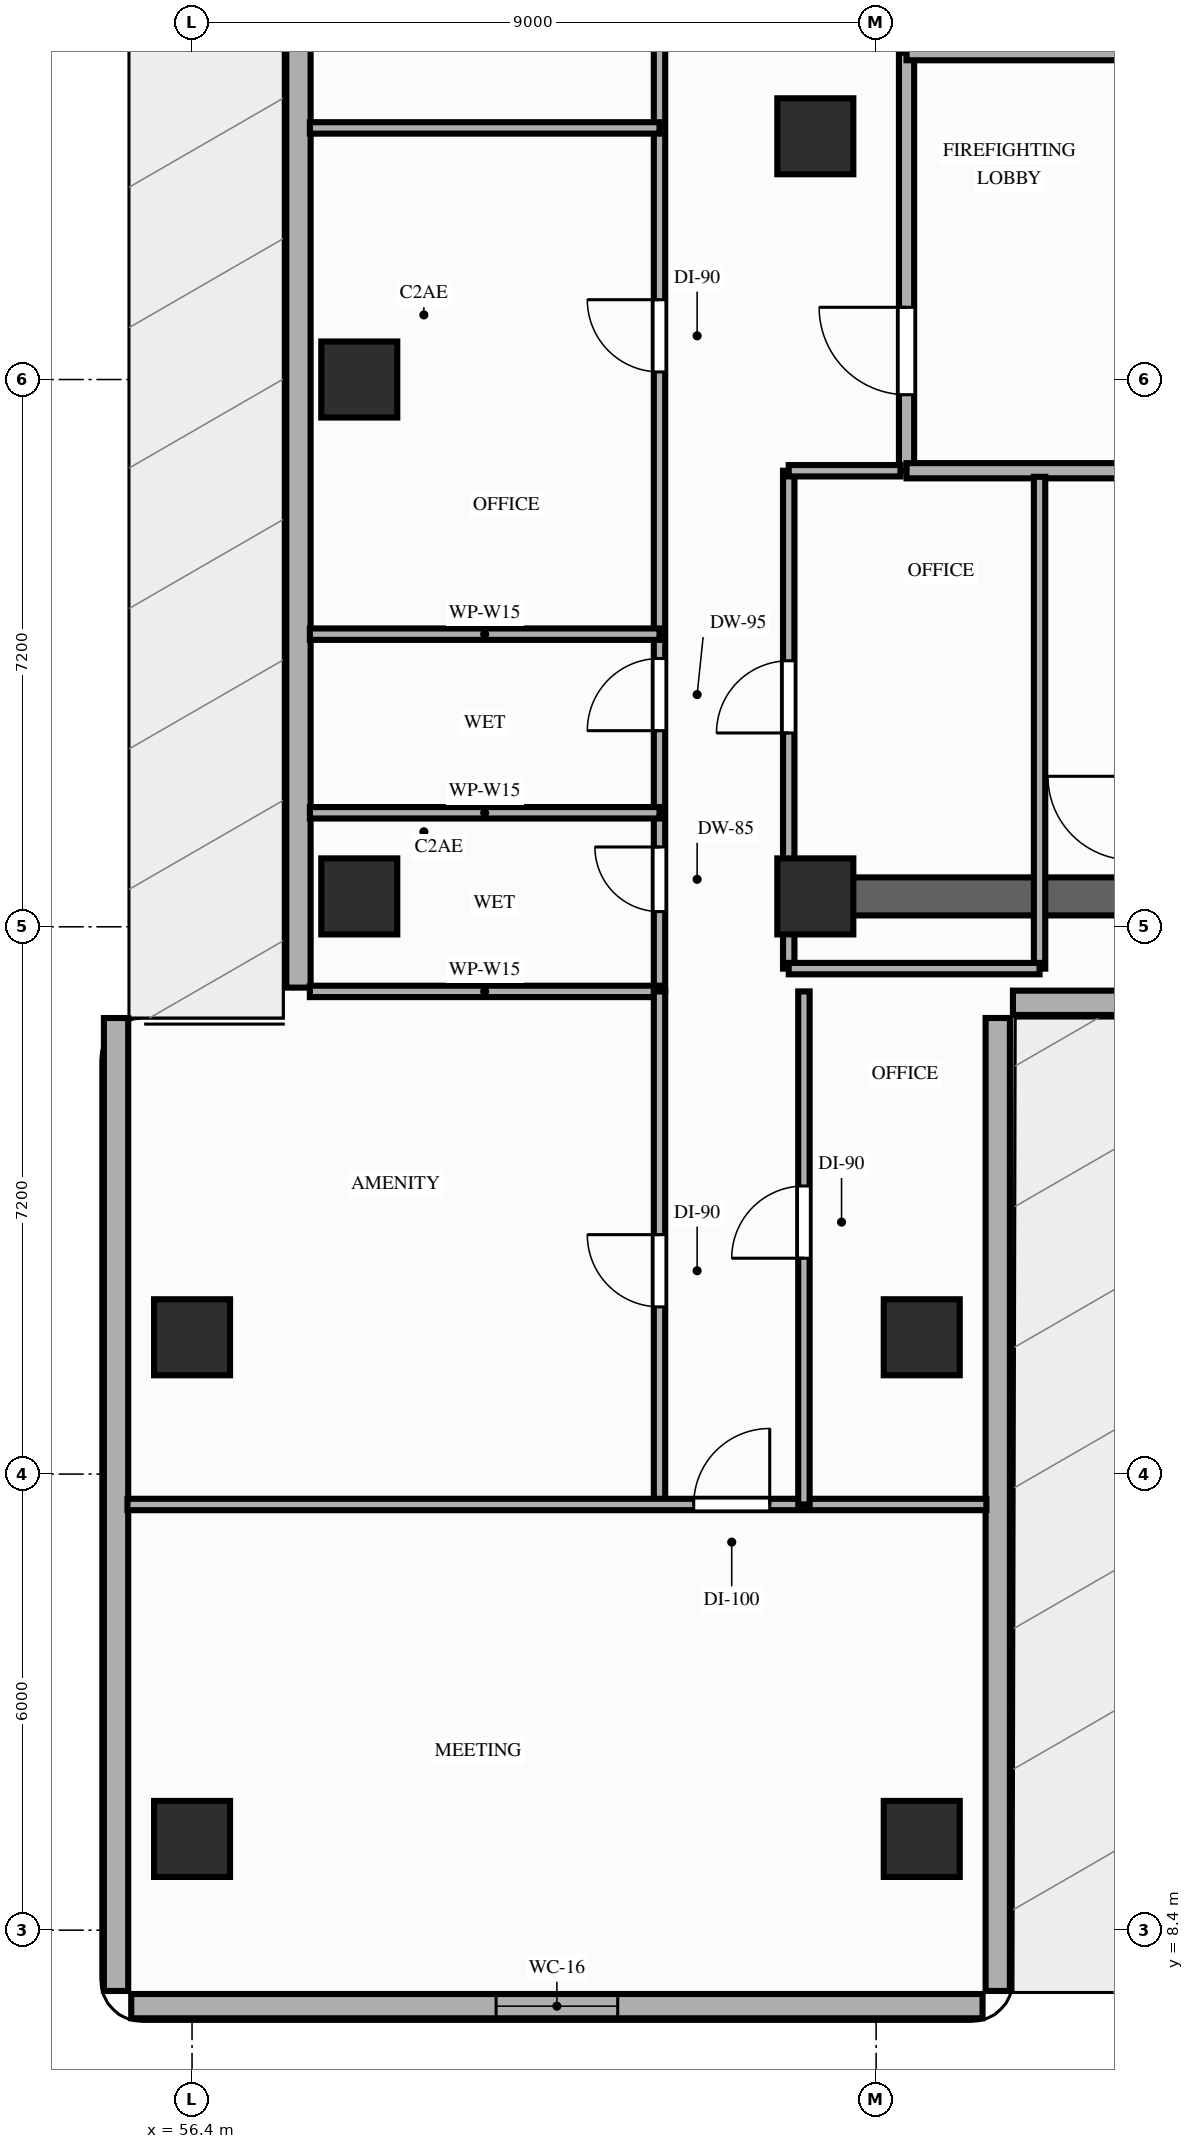
"""IFC4 building model, lengths in metres.
Left out: names, types, materials, properties, quantities, classifications, styles, units other than length and angle.
Written with IfcOpenShell. Run it as: python <this file> out.ifc"""

import sys

from ifc_helpers import new_model, si_unit, direction, frame, frame_2d, origin, origin_2d, place, context, subcontext, project, spatial, rectangle, extrude, element, fill, save


model = new_model("IFC4")
c1 = context("Model", 3, precision=1e-05, world=origin(), true_north=direction((0.0, 1.0)))
c2 = subcontext(c1, "Body", "Model", "MODEL_VIEW")
j1 = project(units=[si_unit("LENGTHUNIT", "METRE"), si_unit("PLANEANGLEUNIT", "RADIAN")], contexts=[c1])
p1 = place(None, origin())
s1 = spatial("IfcSite", under=j1, at=p1, CompositionType="ELEMENT")
p2 = place(p1, origin())
s2 = spatial("IfcBuilding", under=s1, at=p2, CompositionType="ELEMENT")
p3 = place(p2, frame((0.0, 0.0, 26.4)))
s3 = spatial("IfcBuildingStorey", under=s2, at=p3, CompositionType="ELEMENT", Elevation=26.4)
for number, where, z_axis, x_axis in (
    (1, (64.6, 22.0, 0.0), (0.0, 0.0, 1.0), (1.0, 0.0, 0.0)),
    (2, (64.6, 32.0, 0.0), (0.0, 0.0, 1.0), (1.0, 0.0, 0.0)),
):
    element("IfcColumn", number, at=place(p3, frame(where, z_axis=z_axis, x_axis=x_axis)), inside=s3, PredefinedType="COLUMN", context=c2, shape_type="SweptSolid", body=[
        extrude(rectangle(XDim=1.0, YDim=1.0, at=origin_2d()), origin(), (0.0, 0.0, 1.0), 3.8),
    ])
for number, where, z_axis, x_axis in (
    (3, (58.6, 22.0, -0.32), (0.0, 0.0, 1.0), (1.0, 0.0, 0.0)),
    (4, (58.6, 28.8, -0.32), (0.0, 0.0, 1.0), (1.0, 0.0, 0.0)),
):
    element("IfcColumn", number, at=place(p3, frame(where, z_axis=z_axis, x_axis=x_axis)), inside=s3, PredefinedType="COLUMN", context=c2, shape_type="SweptSolid", body=[
        extrude(rectangle(XDim=1.0, YDim=1.0, at=origin_2d()), origin(), (0.0, 0.0, 1.0), 4.12),
    ])
for number, where, z_axis, x_axis in (
    (5, (56.4, 9.6, 0.0), (0.0, 0.0, 1.0), (1.0, 0.0, 0.0)),
    (6, (56.4, 16.2, 0.0), (0.0, 0.0, 1.0), (1.0, 0.0, 0.0)),
    (7, (66.0, 9.6, 0.0), (0.0, 0.0, 1.0), (1.0, 0.0, 0.0)),
    (8, (66.0, 16.2, 0.0), (0.0, 0.0, 1.0), (1.0, 0.0, 0.0)),
):
    element("IfcColumn", number, at=place(p3, frame(where, z_axis=z_axis, x_axis=x_axis)), inside=s3, PredefinedType="COLUMN", context=c2, shape_type="SweptSolid", body=[
        extrude(rectangle(XDim=1.0, YDim=1.0, at=origin_2d()), origin(), (0.0, 0.0, 1.0), 3.8),
    ])
p4 = place(p3, frame((57.8, 43.4, 0.0), z_axis=(0.0, 0.0, 1.0), x_axis=(0.0, -1.0, 0.0)))
e9 = element("IfcWall", 9, at=p4, inside=s3, PredefinedType="STANDARD", context=c2, shape_type="SweptSolid", body=[
    extrude(rectangle(XDim=22.6, YDim=0.32, at=frame_2d((11.3, 0.0))), origin(), (0.0, 0.0, 1.0), 3.1),
])
p5 = place(p4, frame((3.7, 0.0, 0.0)))
e10 = element("IfcOpeningElement", 10, at=p5, cuts=e9, PredefinedType="OPENING", context=c2, shape_type="SweptSolid", body=[
    extrude(rectangle(XDim=1.4, YDim=2.1, at=frame_2d((0.7, 1.05))), frame((0.0, 0.17, 0.0), z_axis=(0.0, -1.0, 0.0), x_axis=(1.0, 0.0, 0.0)), (0.0, 0.0, 1.0), 0.34),
])
p6 = place(p3, frame((55.6, 7.4, 0.0), z_axis=(0.0, 0.0, 1.0), x_axis=(1.0, 0.0, 0.0)))
e11 = element("IfcWall", 11, at=p6, inside=s3, PredefinedType="STANDARD", context=c2, shape_type="SweptSolid", body=[
    extrude(rectangle(XDim=11.2, YDim=0.32, at=frame_2d((5.6, 0.0))), origin(), (0.0, 0.0, 1.0), 3.62),
])
p7 = place(p6, frame((4.8, 0.0, 0.85)))
e12 = element("IfcOpeningElement", 12, at=p7, cuts=e11, PredefinedType="OPENING", context=c2, shape_type="SweptSolid", body=[
    extrude(rectangle(XDim=1.6, YDim=1.7, at=frame_2d((0.8, 0.85))), frame((0.0, 0.17, 0.0), z_axis=(0.0, -1.0, 0.0), x_axis=(1.0, 0.0, 0.0)), (0.0, 0.0, 1.0), 0.34),
])
for number, where, z_axis, x_axis in (
    (13, (55.4, 20.4, 0.0), (0.0, 0.0, 1.0), (0.0, -1.0, 0.0)),
    (14, (67.0, 7.6, 0.0), (0.0, 0.0, 1.0), (0.0, 1.0, 0.0)),
):
    element("IfcWall", number, at=place(p3, frame(where, z_axis=z_axis, x_axis=x_axis)), inside=s3, PredefinedType="STANDARD", context=c2, shape_type="SweptSolid", body=[
        extrude(rectangle(XDim=12.8, YDim=0.32, at=frame_2d((6.4, 0.0))), origin(), (0.0, 0.0, 1.0), 3.62),
    ])
p8 = place(p3, frame((67.2, 20.6, 0.0), z_axis=(0.0, 0.0, 1.0), x_axis=(1.0, 0.0, 0.0)))
e15 = element("IfcWall", 15, at=p8, inside=s3, PredefinedType="STANDARD", context=c2, shape_type="SweptSolid", body=[
    extrude(rectangle(XDim=5.6, YDim=0.32, at=frame_2d((2.8, 0.0))), origin(), (0.0, 0.0, 1.0), 3.62),
])
p9 = place(p3, frame((64.6, 22.0, 0.0), z_axis=(0.0, 0.0, 1.0), x_axis=(1.0, 0.0, 0.0)))
e16 = element("IfcWall", 16, at=p9, inside=s3, PredefinedType="SHEAR", context=c2, shape_type="SweptSolid", body=[
    extrude(rectangle(XDim=7.5, YDim=0.5, at=frame_2d((3.75, 0.0))), origin(), (0.0, 0.0, 1.0), 3.62),
])
p10 = place(p3, frame((65.8, 27.6, 0.0), z_axis=(0.0, 0.0, 1.0), x_axis=(0.0, 1.0, 0.0)))
e17 = element("IfcWall", 17, at=p10, inside=s3, PredefinedType="PARTITIONING", context=c2, shape_type="SweptSolid", body=[
    extrude(rectangle(XDim=5.5, YDim=0.2, at=frame_2d((2.75, 0.0))), origin(), (0.0, 0.0, 1.0), 3.62),
])
p11 = place(p10, frame((1.0, 0.0, 0.0)))
e18 = element("IfcOpeningElement", 18, at=p11, cuts=e17, PredefinedType="OPENING", context=c2, shape_type="SweptSolid", body=[
    extrude(rectangle(XDim=1.15, YDim=2.15, at=frame_2d((0.575, 1.075))), frame((0.0, 0.11, 0.0), z_axis=(0.0, -1.0, 0.0), x_axis=(1.0, 0.0, 0.0)), (0.0, 0.0, 1.0), 0.22),
])
p12 = place(p3, frame((65.8, 33.1, 0.0), z_axis=(0.0, 0.0, 1.0), x_axis=(1.0, 0.0, 0.0)))
e19 = element("IfcWall", 19, at=p12, inside=s3, PredefinedType="PARTITIONING", context=c2, shape_type="SweptSolid", body=[
    extrude(rectangle(XDim=3.6, YDim=0.2, at=frame_2d((1.8, 0.0))), origin(), (0.0, 0.0, 1.0), 3.62),
])
p13 = place(p3, frame((65.8, 27.6, 0.0), z_axis=(0.0, 0.0, 1.0), x_axis=(1.0, 0.0, 0.0)))
e20 = element("IfcWall", 20, at=p13, inside=s3, PredefinedType="PARTITIONING", context=c2, shape_type="SweptSolid", body=[
    extrude(rectangle(XDim=3.4, YDim=0.2, at=frame_2d((1.7, 0.0))), origin(), (0.0, 0.0, 1.0), 3.62),
])
p14 = place(p3, frame((64.25, 21.05, 0.0), z_axis=(0.0, 0.0, 1.0), x_axis=(0.0, 1.0, 0.0)))
e21 = element("IfcWall", 21, at=p14, inside=s3, PredefinedType="PARTITIONING", context=c2, shape_type="SweptSolid", body=[
    extrude(rectangle(XDim=6.55, YDim=0.15, at=frame_2d((3.275, 0.0))), origin(), (0.0, 0.0, 1.0), 3.1),
])
p15 = place(p14, frame((3.1, 0.0, 0.0)))
e22 = element("IfcOpeningElement", 22, at=p15, cuts=e21, PredefinedType="OPENING", context=c2, shape_type="SweptSolid", body=[
    extrude(rectangle(XDim=0.95, YDim=2.15, at=frame_2d((0.475, 1.075))), frame((0.0, 0.085, 0.0), z_axis=(0.0, -1.0, 0.0), x_axis=(1.0, 0.0, 0.0)), (0.0, 0.0, 1.0), 0.17),
])
p16 = place(p3, frame((67.55, 21.05, 0.0), z_axis=(0.0, 0.0, 1.0), x_axis=(0.0, 1.0, 0.0)))
e23 = element("IfcWall", 23, at=p16, inside=s3, PredefinedType="PARTITIONING", context=c2, shape_type="SweptSolid", body=[
    extrude(rectangle(XDim=6.47, YDim=0.15, at=frame_2d((3.235, 0.0))), origin(), (0.0, 0.0, 1.0), 3.1),
])
p17 = place(p3, frame((64.25, 21.05, 0.0), z_axis=(0.0, 0.0, 1.0), x_axis=(1.0, 0.0, 0.0)))
e24 = element("IfcWall", 24, at=p17, inside=s3, PredefinedType="PARTITIONING", context=c2, shape_type="SweptSolid", body=[
    extrude(rectangle(XDim=3.3, YDim=0.15, at=frame_2d((1.65, 0.0))), origin(), (0.0, 0.0, 1.0), 3.1),
])
p18 = place(p3, frame((64.25, 27.6, 0.0), z_axis=(0.0, 0.0, 1.0), x_axis=(1.0, 0.0, 0.0)))
e25 = element("IfcWall", 25, at=p18, inside=s3, PredefinedType="PARTITIONING", context=c2, shape_type="SweptSolid", body=[
    extrude(rectangle(XDim=1.47, YDim=0.15, at=frame_2d((0.735, 0.0))), origin(), (0.0, 0.0, 1.0), 3.1),
])
p19 = place(p3, frame((62.55, 20.75, 0.0), z_axis=(0.0, 0.0, 1.0), x_axis=(0.0, 1.0, 0.0)))
e26 = element("IfcWall", 26, at=p19, inside=s3, PredefinedType="PARTITIONING", context=c2, shape_type="SweptSolid", body=[
    extrude(rectangle(XDim=22.7, YDim=0.15, at=frame_2d((11.35, 0.0))), origin(), (0.0, 0.0, 1.0), 3.1),
])
p20 = place(p19, frame((1.05, 0.0, 0.0)))
e27 = element("IfcOpeningElement", 27, at=p20, cuts=e26, PredefinedType="OPENING", context=c2, shape_type="SweptSolid", body=[
    extrude(rectangle(XDim=0.85, YDim=2.1, at=frame_2d((0.425, 1.05))), frame((0.0, 0.085, 0.0), z_axis=(0.0, -1.0, 0.0), x_axis=(1.0, 0.0, 0.0)), (0.0, 0.0, 1.0), 0.17),
])
p21 = place(p19, frame((3.43, 0.0, 0.0)))
e28 = element("IfcOpeningElement", 28, at=p21, cuts=e26, PredefinedType="OPENING", context=c2, shape_type="SweptSolid", body=[
    extrude(rectangle(XDim=0.95, YDim=2.1, at=frame_2d((0.475, 1.05))), frame((0.0, 0.085, 0.0), z_axis=(0.0, -1.0, 0.0), x_axis=(1.0, 0.0, 0.0)), (0.0, 0.0, 1.0), 0.17),
])
p22 = place(p19, frame((8.15, 0.0, 0.0)))
e29 = element("IfcOpeningElement", 29, at=p22, cuts=e26, PredefinedType="OPENING", context=c2, shape_type="SweptSolid", body=[
    extrude(rectangle(XDim=0.95, YDim=2.15, at=frame_2d((0.475, 1.075))), frame((0.0, 0.085, 0.0), z_axis=(0.0, -1.0, 0.0), x_axis=(1.0, 0.0, 0.0)), (0.0, 0.0, 1.0), 0.17),
])
p23 = place(p19, frame((16.55, 0.0, 0.0)))
e30 = element("IfcOpeningElement", 30, at=p23, cuts=e26, PredefinedType="OPENING", context=c2, shape_type="SweptSolid", body=[
    extrude(rectangle(XDim=0.95, YDim=2.15, at=frame_2d((0.475, 1.075))), frame((0.0, 0.085, 0.0), z_axis=(0.0, -1.0, 0.0), x_axis=(1.0, 0.0, 0.0)), (0.0, 0.0, 1.0), 0.17),
])
for number, where, z_axis, x_axis in (
    (31, (57.95, 20.75, 0.0), (0.0, 0.0, 1.0), (1.0, 0.0, 0.0)),
    (32, (57.95, 23.1, 0.0), (0.0, 0.0, 1.0), (1.0, 0.0, 0.0)),
    (33, (57.95, 25.45, 0.0), (0.0, 0.0, 1.0), (1.0, 0.0, 0.0)),
    (34, (57.95, 32.11, 0.0), (0.0, 0.0, 1.0), (1.0, 0.0, 0.0)),
):
    element("IfcWall", number, at=place(p3, frame(where, z_axis=z_axis, x_axis=x_axis)), inside=s3, PredefinedType="PARTITIONING", context=c2, shape_type="SweptSolid", body=[
        extrude(rectangle(XDim=4.6, YDim=0.15, at=frame_2d((2.3, 0.0))), origin(), (0.0, 0.0, 1.0), 3.1),
    ])
p24 = place(p3, frame((62.55, 14.0, 0.0), z_axis=(0.0, 0.0, 1.0), x_axis=(0.0, 1.0, 0.0)))
e35 = element("IfcWall", 35, at=p24, inside=s3, PredefinedType="PARTITIONING", context=c2, shape_type="SweptSolid", body=[
    extrude(rectangle(XDim=6.75, YDim=0.15, at=frame_2d((3.375, 0.0))), origin(), (0.0, 0.0, 1.0), 3.1),
])
p25 = place(p24, frame((2.6, 0.0, 0.0)))
e36 = element("IfcOpeningElement", 36, at=p25, cuts=e35, PredefinedType="OPENING", context=c2, shape_type="SweptSolid", body=[
    extrude(rectangle(XDim=0.95, YDim=2.15, at=frame_2d((0.475, 1.075))), frame((0.0, 0.085, 0.0), z_axis=(0.0, -1.0, 0.0), x_axis=(1.0, 0.0, 0.0)), (0.0, 0.0, 1.0), 0.17),
])
p26 = place(p3, frame((55.55, 14.0, 0.0), z_axis=(0.0, 0.0, 1.0), x_axis=(1.0, 0.0, 0.0)))
e37 = element("IfcWall", 37, at=p26, inside=s3, PredefinedType="PARTITIONING", context=c2, shape_type="SweptSolid", body=[
    extrude(rectangle(XDim=11.3, YDim=0.15, at=frame_2d((5.65, 0.0))), origin(), (0.0, 0.0, 1.0), 3.1),
])
p27 = place(p26, frame((7.45, 0.0, 0.0)))
e38 = element("IfcOpeningElement", 38, at=p27, cuts=e37, PredefinedType="OPENING", context=c2, shape_type="SweptSolid", body=[
    extrude(rectangle(XDim=1.0, YDim=2.15, at=frame_2d((0.5, 1.075))), frame((0.0, 0.085, 0.0), z_axis=(0.0, -1.0, 0.0), x_axis=(1.0, 0.0, 0.0)), (0.0, 0.0, 1.0), 0.17),
])
p28 = place(p3, frame((64.45, 14.0, 0.0), z_axis=(0.0, 0.0, 1.0), x_axis=(0.0, 1.0, 0.0)))
e39 = element("IfcWall", 39, at=p28, inside=s3, PredefinedType="PARTITIONING", context=c2, shape_type="SweptSolid", body=[
    extrude(rectangle(XDim=6.75, YDim=0.15, at=frame_2d((3.375, 0.0))), origin(), (0.0, 0.0, 1.0), 3.1),
])
p29 = place(p28, frame((3.24, 0.0, 0.0)))
e40 = element("IfcOpeningElement", 40, at=p29, cuts=e39, PredefinedType="OPENING", context=c2, shape_type="SweptSolid", body=[
    extrude(rectangle(XDim=0.95, YDim=2.15, at=frame_2d((0.475, 1.075))), frame((0.0, 0.085, 0.0), z_axis=(0.0, -1.0, 0.0), x_axis=(1.0, 0.0, 0.0)), (0.0, 0.0, 1.0), 0.17),
])
p30 = place(p7, origin())
e41 = element("IfcWindow", 41, at=p30, inside=s3, PartitioningType="SINGLE_PANEL", PredefinedType="WINDOW", context=c2, shape_type="SweptSolid", body=[
    extrude(rectangle(XDim=1.6, YDim=1.7, at=frame_2d((0.8, 0.85))), frame((0.0, 0.03, 0.0), z_axis=(0.0, -1.0, 0.0), x_axis=(1.0, 0.0, 0.0)), (0.0, 0.0, 1.0), 0.06),
])
fill(e12, e41)
p31 = place(p11, origin())
e42 = element("IfcDoor", 42, at=p31, inside=s3, OperationType="SINGLE_SWING_RIGHT", PredefinedType="DOOR", context=c2, shape_type="SweptSolid", body=[
    extrude(rectangle(XDim=1.15, YDim=2.15, at=frame_2d((0.575, 1.075))), frame((0.0, 0.025, 0.0), z_axis=(0.0, -1.0, 0.0), x_axis=(1.0, 0.0, 0.0)), (0.0, 0.0, 1.0), 0.05),
])
fill(e18, e42)
p32 = place(p15, origin())
e43 = element("IfcDoor", 43, at=p32, inside=s3, OperationType="SINGLE_SWING_LEFT", PredefinedType="DOOR", context=c2, shape_type="SweptSolid", body=[
    extrude(rectangle(XDim=0.95, YDim=2.15, at=frame_2d((0.475, 1.075))), frame((0.0, 0.025, 0.0), z_axis=(0.0, -1.0, 0.0), x_axis=(1.0, 0.0, 0.0)), (0.0, 0.0, 1.0), 0.05),
])
fill(e22, e43)
p33 = place(p20, origin())
e44 = element("IfcDoor", 44, at=p33, inside=s3, OperationType="SINGLE_SWING_RIGHT", PredefinedType="DOOR", context=c2, shape_type="SweptSolid", body=[
    extrude(rectangle(XDim=0.85, YDim=2.1, at=frame_2d((0.425, 1.05))), frame((0.0, 0.025, 0.0), z_axis=(0.0, -1.0, 0.0), x_axis=(1.0, 0.0, 0.0)), (0.0, 0.0, 1.0), 0.05),
])
fill(e27, e44)
p34 = place(p21, origin())
e45 = element("IfcDoor", 45, at=p34, inside=s3, OperationType="SINGLE_SWING_LEFT", PredefinedType="DOOR", context=c2, shape_type="SweptSolid", body=[
    extrude(rectangle(XDim=0.95, YDim=2.1, at=frame_2d((0.475, 1.05))), frame((0.0, 0.025, 0.0), z_axis=(0.0, -1.0, 0.0), x_axis=(1.0, 0.0, 0.0)), (0.0, 0.0, 1.0), 0.05),
])
fill(e28, e45)
p35 = place(p22, origin())
e46 = element("IfcDoor", 46, at=p35, inside=s3, OperationType="SINGLE_SWING_RIGHT", PredefinedType="DOOR", context=c2, shape_type="SweptSolid", body=[
    extrude(rectangle(XDim=0.95, YDim=2.15, at=frame_2d((0.475, 1.075))), frame((0.0, 0.025, 0.0), z_axis=(0.0, -1.0, 0.0), x_axis=(1.0, 0.0, 0.0)), (0.0, 0.0, 1.0), 0.05),
])
fill(e29, e46)
p36 = place(p25, origin())
e47 = element("IfcDoor", 47, at=p36, inside=s3, OperationType="SINGLE_SWING_RIGHT", PredefinedType="DOOR", context=c2, shape_type="SweptSolid", body=[
    extrude(rectangle(XDim=0.95, YDim=2.15, at=frame_2d((0.475, 1.075))), frame((0.0, 0.025, 0.0), z_axis=(0.0, -1.0, 0.0), x_axis=(1.0, 0.0, 0.0)), (0.0, 0.0, 1.0), 0.05),
])
fill(e36, e47)
p37 = place(p29, origin())
e48 = element("IfcDoor", 48, at=p37, inside=s3, OperationType="SINGLE_SWING_LEFT", PredefinedType="DOOR", context=c2, shape_type="SweptSolid", body=[
    extrude(rectangle(XDim=0.95, YDim=2.15, at=frame_2d((0.475, 1.075))), frame((0.0, 0.025, 0.0), z_axis=(0.0, -1.0, 0.0), x_axis=(1.0, 0.0, 0.0)), (0.0, 0.0, 1.0), 0.05),
])
fill(e40, e48)
p38 = place(p27, origin())
e49 = element("IfcDoor", 49, at=p38, inside=s3, OperationType="SINGLE_SWING_RIGHT", PredefinedType="DOOR", context=c2, shape_type="SweptSolid", body=[
    extrude(rectangle(XDim=1.0, YDim=2.15, at=frame_2d((0.5, 1.075))), frame((0.0, 0.025, 0.0), z_axis=(0.0, -1.0, 0.0), x_axis=(1.0, 0.0, 0.0)), (0.0, 0.0, 1.0), 0.05),
])
fill(e38, e49)
save(model, sys.argv[1])
